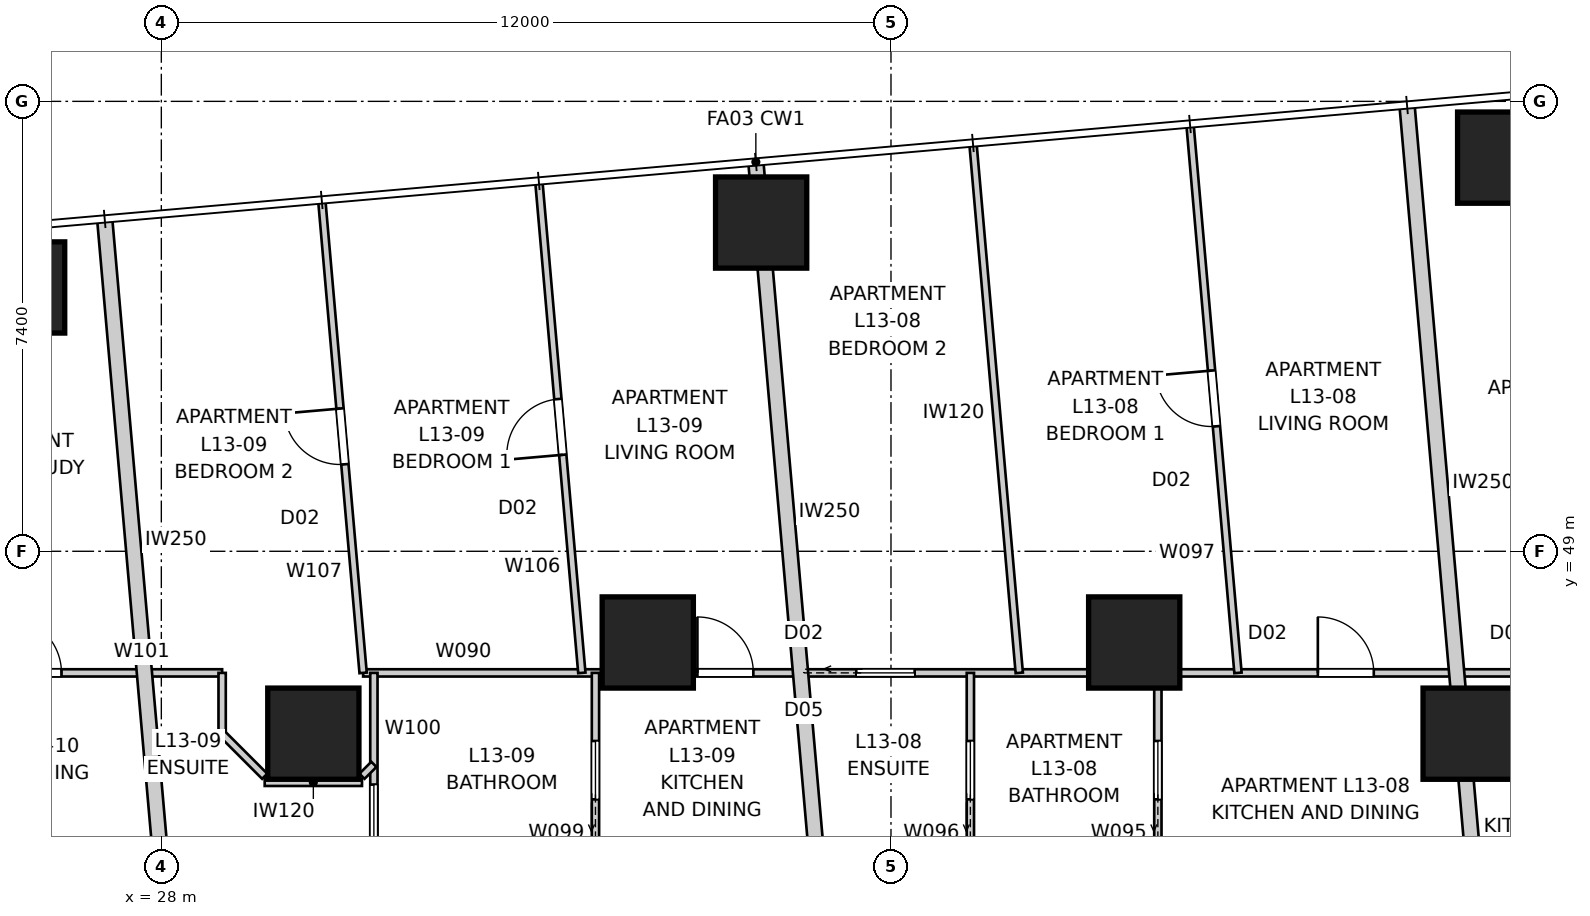
"""IFC4 building model, lengths in metres.
Left out: names, types, materials, properties, quantities, classifications, styles, units other than length and angle.
Written with IfcOpenShell. Run it as: python <this file> out.ifc"""

import sys

from ifc_helpers import new_model, si_unit, direction, frame, frame_2d, origin, origin_2d, place, context, subcontext, project, spatial, rectangle, extrude, element, fill, save


model = new_model("IFC4")
c1 = context("Model", 3, precision=1e-05, world=origin(), true_north=direction((0.0, 1.0)))
c2 = subcontext(c1, "Body", "Model", "MODEL_VIEW")
j1 = project(units=[si_unit("LENGTHUNIT", "METRE"), si_unit("PLANEANGLEUNIT", "RADIAN")], contexts=[c1])
p1 = place(None, origin())
s1 = spatial("IfcSite", under=j1, at=p1, CompositionType="ELEMENT")
p2 = place(p1, origin())
s2 = spatial("IfcBuilding", under=s1, at=p2, CompositionType="ELEMENT")
p3 = place(p2, frame((0.0, 0.0, 50.6)))
s3 = spatial("IfcBuildingStorey", under=s2, at=p3, CompositionType="ELEMENT", Elevation=50.6)
for number, where, z_axis, x_axis in (
    (1, (50.068, 55.474, 0.0), (0.0, 0.0, 1.0), (1.0, 0.0, 0.0)),
    (2, (37.865, 54.407, 0.0), (0.0, 0.0, 1.0), (1.0, 0.0, 0.0)),
    (3, (25.661, 53.339, 0.0), (0.0, 0.0, 1.0), (1.0, 0.0, 0.0)),
    (4, (49.5, 46.0, 0.0), (0.0, 0.0, 1.0), (1.0, 0.0, 0.0)),
    (5, (44.0, 47.5, 0.0), (0.0, 0.0, 1.0), (1.0, 0.0, 0.0)),
    (6, (36.0, 47.5, 0.0), (0.0, 0.0, 1.0), (1.0, 0.0, 0.0)),
    (7, (30.5, 46.0, 0.0), (0.0, 0.0, 1.0), (1.0, 0.0, 0.0)),
):
    element("IfcColumn", number, at=place(p3, frame(where, z_axis=z_axis, x_axis=x_axis)), inside=s3, PredefinedType="COLUMN", context=c2, shape_type="SweptSolid", body=[
        extrude(rectangle(XDim=1.5, YDim=1.5, at=origin_2d()), origin(), (0.0, 0.0, 1.0), 3.4),
    ])
p4 = place(p3, frame((37.778, 55.403, 0.0), z_axis=(0.0, 0.0, 1.0), x_axis=(0.087147497287, -0.996195419442, 0.0)))
e8 = element("IfcWall", 8, at=p4, inside=s3, PredefinedType="PARTITIONING", context=c2, shape_type="SweptSolid", body=[
    extrude(rectangle(XDim=11.677, YDim=0.25, at=frame_2d((5.838, 0.0))), origin(), (0.0, 0.0, 1.0), 3.25),
])
p5 = place(p3, frame((48.487, 56.34, 0.0), z_axis=(0.0, 0.0, 1.0), x_axis=(0.087153988028, -0.996194851608, 0.0)))
e9 = element("IfcWall", 9, at=p5, inside=s3, PredefinedType="PARTITIONING", context=c2, shape_type="SweptSolid", body=[
    extrude(rectangle(XDim=12.617, YDim=0.25, at=frame_2d((6.309, 0.0))), origin(), (0.0, 0.0, 1.0), 3.25),
])
p6 = place(p3, frame((27.068, 54.466, 0.0), z_axis=(0.0, 0.0, 1.0), x_axis=(0.08716441141, -0.996193939644, 0.0)))
e10 = element("IfcWall", 10, at=p6, inside=s3, PredefinedType="PARTITIONING", context=c2, shape_type="SweptSolid", body=[
    extrude(rectangle(XDim=10.736, YDim=0.25, at=frame_2d((5.368, 0.0))), origin(), (0.0, 0.0, 1.0), 3.25),
])
p7 = place(p3, frame((31.319, 47.0, 0.0), z_axis=(0.0, 0.0, 1.0), x_axis=(1.0, 0.0, 0.0)))
e11 = element("IfcWall", 11, at=p7, inside=s3, PredefinedType="PARTITIONING", context=c2, shape_type="SweptSolid", body=[
    extrude(rectangle(XDim=25.681, YDim=0.12, at=frame_2d((12.841, 0.0))), origin(), (0.0, 0.0, 1.0), 2.55),
])
p8 = place(p7, frame((15.701, 0.0, 0.0)))
e12 = element("IfcOpeningElement", 12, at=p8, cuts=e11, PredefinedType="OPENING", context=c2, shape_type="SweptSolid", body=[
    extrude(rectangle(XDim=0.92, YDim=2.34, at=frame_2d((0.46, 1.17))), frame((0.0, 0.07, 0.0), z_axis=(0.0, -1.0, 0.0), x_axis=(1.0, 0.0, 0.0)), (0.0, 0.0, 1.0), 0.14),
])
p9 = place(p7, frame((19.676, 0.0, 0.0)))
e13 = element("IfcOpeningElement", 13, at=p9, cuts=e11, PredefinedType="OPENING", context=c2, shape_type="SweptSolid", body=[
    extrude(rectangle(XDim=0.92, YDim=2.34, at=frame_2d((0.46, 1.17))), frame((0.0, 0.07, 0.0), z_axis=(0.0, -1.0, 0.0), x_axis=(1.0, 0.0, 0.0)), (0.0, 0.0, 1.0), 0.14),
])
p10 = place(p7, frame((5.498, 0.0, 0.0)))
e14 = element("IfcOpeningElement", 14, at=p10, cuts=e11, PredefinedType="OPENING", context=c2, shape_type="SweptSolid", body=[
    extrude(rectangle(XDim=0.92, YDim=2.34, at=frame_2d((0.46, 1.17))), frame((0.0, 0.07, 0.0), z_axis=(0.0, -1.0, 0.0), x_axis=(1.0, 0.0, 0.0)), (0.0, 0.0, 1.0), 0.14),
])
p11 = place(p7, frame((8.11, 0.0, 0.0)))
e15 = element("IfcOpeningElement", 15, at=p11, cuts=e11, PredefinedType="OPENING", context=c2, shape_type="SweptSolid", body=[
    extrude(rectangle(XDim=0.96, YDim=2.1, at=frame_2d((0.48, 1.05))), frame((0.0, 0.07, 0.0), z_axis=(0.0, -1.0, 0.0), x_axis=(1.0, 0.0, 0.0)), (0.0, 0.0, 1.0), 0.14),
])
p12 = place(p3, frame((44.389, 43.8, 0.0), z_axis=(0.0, 0.0, 1.0), x_axis=(0.0, 1.0, 0.0)))
e16 = element("IfcWall", 16, at=p12, inside=s3, PredefinedType="PARTITIONING", context=c2, shape_type="SweptSolid", body=[
    extrude(rectangle(XDim=3.2, YDim=0.12, at=frame_2d((1.6, 0.0))), origin(), (0.0, 0.0, 1.0), 3.25),
])
p13 = place(p12, frame((1.12, 0.0, 0.0)))
e17 = element("IfcOpeningElement", 17, at=p13, cuts=e16, PredefinedType="OPENING", context=c2, shape_type="SweptSolid", body=[
    extrude(rectangle(XDim=0.96, YDim=2.1, at=frame_2d((0.48, 1.05))), frame((0.0, 0.07, 0.0), z_axis=(0.0, -1.0, 0.0), x_axis=(1.0, 0.0, 0.0)), (0.0, 0.0, 1.0), 0.14),
])
p14 = place(p3, frame((41.305, 43.8, 0.0), z_axis=(0.0, 0.0, 1.0), x_axis=(0.0, 1.0, 0.0)))
e18 = element("IfcWall", 18, at=p14, inside=s3, PredefinedType="PARTITIONING", context=c2, shape_type="SweptSolid", body=[
    extrude(rectangle(XDim=3.2, YDim=0.12, at=frame_2d((1.6, 0.0))), origin(), (0.0, 0.0, 1.0), 3.25),
])
p15 = place(p14, frame((1.12, 0.0, 0.0)))
e19 = element("IfcOpeningElement", 19, at=p15, cuts=e18, PredefinedType="OPENING", context=c2, shape_type="SweptSolid", body=[
    extrude(rectangle(XDim=0.96, YDim=2.1, at=frame_2d((0.48, 1.05))), frame((0.0, 0.07, 0.0), z_axis=(0.0, -1.0, 0.0), x_axis=(1.0, 0.0, 0.0)), (0.0, 0.0, 1.0), 0.14),
])
p16 = place(p3, frame((45.707, 47.0, 0.0), z_axis=(0.0, 0.0, 1.0), x_axis=(-0.087160907995, 0.996194246178, 0.0)))
e20 = element("IfcWall", 20, at=p16, inside=s3, PredefinedType="PARTITIONING", context=c2, shape_type="SweptSolid", body=[
    extrude(rectangle(XDim=9.022, YDim=0.12, at=frame_2d((4.511, 0.0))), origin(), (0.0, 0.0, 1.0), 3.25),
])
p17 = place(p16, frame((4.071, 0.0, 0.0)))
e21 = element("IfcOpeningElement", 21, at=p17, cuts=e20, PredefinedType="OPENING", context=c2, shape_type="SweptSolid", body=[
    extrude(rectangle(XDim=0.92, YDim=2.34, at=frame_2d((0.46, 1.17))), frame((0.0, 0.07, 0.0), z_axis=(0.0, -1.0, 0.0), x_axis=(1.0, 0.0, 0.0)), (0.0, 0.0, 1.0), 0.14),
])
p18 = place(p3, frame((42.11, 47.0, 0.0), z_axis=(0.0, 0.0, 1.0), x_axis=(-0.087158256162, 0.996194478193, 0.0)))
e22 = element("IfcWall", 22, at=p18, inside=s3, PredefinedType="PARTITIONING", context=c2, shape_type="SweptSolid", body=[
    extrude(rectangle(XDim=8.709, YDim=0.12, at=frame_2d((4.354, 0.0))), origin(), (0.0, 0.0, 1.0), 3.25),
])
p19 = place(p3, frame((35.14, 43.8, 0.0), z_axis=(0.0, 0.0, 1.0), x_axis=(0.0, 1.0, 0.0)))
e23 = element("IfcWall", 23, at=p19, inside=s3, PredefinedType="PARTITIONING", context=c2, shape_type="SweptSolid", body=[
    extrude(rectangle(XDim=3.2, YDim=0.12, at=frame_2d((1.6, 0.0))), origin(), (0.0, 0.0, 1.0), 3.25),
])
p20 = place(p19, frame((1.12, 0.0, 0.0)))
e24 = element("IfcOpeningElement", 24, at=p20, cuts=e23, PredefinedType="OPENING", context=c2, shape_type="SweptSolid", body=[
    extrude(rectangle(XDim=0.96, YDim=2.1, at=frame_2d((0.48, 1.05))), frame((0.0, 0.07, 0.0), z_axis=(0.0, -1.0, 0.0), x_axis=(1.0, 0.0, 0.0)), (0.0, 0.0, 1.0), 0.14),
])
p21 = place(p3, frame((31.496, 43.8, 0.0), z_axis=(0.0, 0.0, 1.0), x_axis=(0.0, 1.0, 0.0)))
e25 = element("IfcWall", 25, at=p21, inside=s3, PredefinedType="PARTITIONING", context=c2, shape_type="SweptSolid", body=[
    extrude(rectangle(XDim=3.2, YDim=0.12, at=frame_2d((1.6, 0.0))), origin(), (0.0, 0.0, 1.0), 3.25),
])
p22 = place(p21, frame((0.403, 0.0, 0.0)))
e26 = element("IfcOpeningElement", 26, at=p22, cuts=e25, PredefinedType="OPENING", context=c2, shape_type="SweptSolid", body=[
    extrude(rectangle(XDim=0.96, YDim=2.1, at=frame_2d((0.48, 1.05))), frame((0.0, 0.07, 0.0), z_axis=(0.0, -1.0, 0.0), x_axis=(1.0, 0.0, 0.0)), (0.0, 0.0, 1.0), 0.14),
])
p23 = place(p3, frame((23.0, 47.0, 0.0), z_axis=(0.0, 0.0, 1.0), x_axis=(1.0, 0.0, 0.0)))
e27 = element("IfcWall", 27, at=p23, inside=s3, PredefinedType="PARTITIONING", context=c2, shape_type="SweptSolid", body=[
    extrude(rectangle(XDim=6.0, YDim=0.12, at=frame_2d((3.0, 0.0))), origin(), (0.0, 0.0, 1.0), 3.25),
])
p24 = place(p23, frame((2.438, 0.0, 0.0)))
e28 = element("IfcOpeningElement", 28, at=p24, cuts=e27, PredefinedType="OPENING", context=c2, shape_type="SweptSolid", body=[
    extrude(rectangle(XDim=0.92, YDim=2.34, at=frame_2d((0.46, 1.17))), frame((0.0, 0.07, 0.0), z_axis=(0.0, -1.0, 0.0), x_axis=(1.0, 0.0, 0.0)), (0.0, 0.0, 1.0), 0.14),
])
p25 = place(p3, frame((29.0, 47.0, 0.0), z_axis=(0.0, 0.0, 1.0), x_axis=(0.0, -1.0, 0.0)))
e29 = element("IfcWall", 29, at=p25, inside=s3, PredefinedType="PARTITIONING", context=c2, shape_type="SweptSolid", body=[
    extrude(rectangle(XDim=1.0, YDim=0.12, at=frame_2d((0.5, 0.0))), origin(), (0.0, 0.0, 1.0), 3.25),
])
p26 = place(p3, frame((29.0, 46.0, 0.0), z_axis=(0.0, 0.0, 1.0), x_axis=(0.707106781187, -0.707106781187, 0.0)))
e30 = element("IfcWall", 30, at=p26, inside=s3, PredefinedType="PARTITIONING", context=c2, shape_type="SweptSolid", body=[
    extrude(rectangle(XDim=0.99, YDim=0.12, at=frame_2d((0.495, 0.0))), origin(), (0.0, 0.0, 1.0), 3.25),
])
p27 = place(p3, frame((29.7, 45.2, 0.0), z_axis=(0.0, 0.0, 1.0), x_axis=(1.0, 0.0, 0.0)))
e31 = element("IfcWall", 31, at=p27, inside=s3, PredefinedType="PARTITIONING", context=c2, shape_type="SweptSolid", body=[
    extrude(rectangle(XDim=1.6, YDim=0.12, at=frame_2d((0.8, 0.0))), origin(), (0.0, 0.0, 1.0), 3.25),
])
p28 = place(p3, frame((31.3, 45.3, 0.0), z_axis=(0.0, 0.0, 1.0), x_axis=(0.707106781187, 0.707106781187, 0.0)))
e32 = element("IfcWall", 32, at=p28, inside=s3, PredefinedType="PARTITIONING", context=c2, shape_type="SweptSolid", body=[
    extrude(rectangle(XDim=0.277, YDim=0.12, at=frame_2d((0.138, 0.0))), origin(), (0.0, 0.0, 1.0), 3.25),
])
p29 = place(p3, frame((34.916, 47.0, 0.0), z_axis=(0.0, 0.0, 1.0), x_axis=(-0.087184938313, 0.99619214338, 0.0)))
e33 = element("IfcWall", 33, at=p29, inside=s3, PredefinedType="PARTITIONING", context=c2, shape_type="SweptSolid", body=[
    extrude(rectangle(XDim=8.082, YDim=0.12, at=frame_2d((4.041, 0.0))), origin(), (0.0, 0.0, 1.0), 3.25),
])
p30 = place(p29, frame((3.601, 0.0, 0.0)))
e34 = element("IfcOpeningElement", 34, at=p30, cuts=e33, PredefinedType="OPENING", context=c2, shape_type="SweptSolid", body=[
    extrude(rectangle(XDim=0.92, YDim=2.34, at=frame_2d((0.46, 1.17))), frame((0.0, 0.07, 0.0), z_axis=(0.0, -1.0, 0.0), x_axis=(1.0, 0.0, 0.0)), (0.0, 0.0, 1.0), 0.14),
])
p31 = place(p3, frame((31.319, 47.0, 0.0), z_axis=(0.0, 0.0, 1.0), x_axis=(-0.0871517452, 0.996195047824, 0.0)))
e35 = element("IfcWall", 35, at=p31, inside=s3, PredefinedType="PARTITIONING", context=c2, shape_type="SweptSolid", body=[
    extrude(rectangle(XDim=7.768, YDim=0.12, at=frame_2d((3.884, 0.0))), origin(), (0.0, 0.0, 1.0), 3.25),
])
p32 = place(p31, frame((3.444, 0.0, 0.0)))
e36 = element("IfcOpeningElement", 36, at=p32, cuts=e35, PredefinedType="OPENING", context=c2, shape_type="SweptSolid", body=[
    extrude(rectangle(XDim=0.92, YDim=2.34, at=frame_2d((0.46, 1.17))), frame((0.0, 0.07, 0.0), z_axis=(0.0, -1.0, 0.0), x_axis=(1.0, 0.0, 0.0)), (0.0, 0.0, 1.0), 0.14),
])
p33 = place(p8, origin())
e37 = element("IfcDoor", 37, at=p33, inside=s3, OperationType="SINGLE_SWING_LEFT", PredefinedType="DOOR", context=c2, shape_type="SweptSolid", body=[
    extrude(rectangle(XDim=0.92, YDim=2.34, at=frame_2d((0.46, 1.17))), frame((0.0, 0.025, 0.0), z_axis=(0.0, -1.0, 0.0), x_axis=(1.0, 0.0, 0.0)), (0.0, 0.0, 1.0), 0.05),
])
fill(e12, e37)
p34 = place(p13, origin())
e38 = element("IfcDoor", 38, at=p34, inside=s3, OperationType="SLIDING_TO_LEFT", PredefinedType="DOOR", context=c2, shape_type="SweptSolid", body=[
    extrude(rectangle(XDim=0.96, YDim=2.1, at=frame_2d((0.48, 1.05))), frame((0.0, 0.025, 0.0), z_axis=(0.0, -1.0, 0.0), x_axis=(1.0, 0.0, 0.0)), (0.0, 0.0, 1.0), 0.05),
])
fill(e17, e38)
p35 = place(p10, origin())
e39 = element("IfcDoor", 39, at=p35, inside=s3, OperationType="SINGLE_SWING_LEFT", PredefinedType="DOOR", context=c2, shape_type="SweptSolid", body=[
    extrude(rectangle(XDim=0.92, YDim=2.34, at=frame_2d((0.46, 1.17))), frame((0.0, 0.025, 0.0), z_axis=(0.0, -1.0, 0.0), x_axis=(1.0, 0.0, 0.0)), (0.0, 0.0, 1.0), 0.05),
])
fill(e14, e39)
p36 = place(p20, origin())
e40 = element("IfcDoor", 40, at=p36, inside=s3, OperationType="SLIDING_TO_LEFT", PredefinedType="DOOR", context=c2, shape_type="SweptSolid", body=[
    extrude(rectangle(XDim=0.96, YDim=2.1, at=frame_2d((0.48, 1.05))), frame((0.0, 0.025, 0.0), z_axis=(0.0, -1.0, 0.0), x_axis=(1.0, 0.0, 0.0)), (0.0, 0.0, 1.0), 0.05),
])
fill(e24, e40)
p37 = place(p24, origin())
e41 = element("IfcDoor", 41, at=p37, inside=s3, OperationType="SINGLE_SWING_LEFT", PredefinedType="DOOR", context=c2, shape_type="SweptSolid", body=[
    extrude(rectangle(XDim=0.92, YDim=2.34, at=frame_2d((0.46, 1.17))), frame((0.0, 0.025, 0.0), z_axis=(0.0, -1.0, 0.0), x_axis=(1.0, 0.0, 0.0)), (0.0, 0.0, 1.0), 0.05),
])
fill(e28, e41)
p38 = place(p17, origin())
e42 = element("IfcDoor", 42, at=p38, inside=s3, OperationType="SINGLE_SWING_RIGHT", PredefinedType="DOOR", context=c2, shape_type="SweptSolid", body=[
    extrude(rectangle(XDim=0.92, YDim=2.34, at=frame_2d((0.46, 1.17))), frame((0.0, 0.025, 0.0), z_axis=(0.0, -1.0, 0.0), x_axis=(1.0, 0.0, 0.0)), (0.0, 0.0, 1.0), 0.05),
])
fill(e21, e42)
p39 = place(p15, origin())
e43 = element("IfcDoor", 43, at=p39, inside=s3, OperationType="SLIDING_TO_LEFT", PredefinedType="DOOR", context=c2, shape_type="SweptSolid", body=[
    extrude(rectangle(XDim=0.96, YDim=2.1, at=frame_2d((0.48, 1.05))), frame((0.0, 0.025, 0.0), z_axis=(0.0, -1.0, 0.0), x_axis=(1.0, 0.0, 0.0)), (0.0, 0.0, 1.0), 0.05),
])
fill(e19, e43)
p40 = place(p30, origin())
e44 = element("IfcDoor", 44, at=p40, inside=s3, OperationType="SINGLE_SWING_LEFT", PredefinedType="DOOR", context=c2, shape_type="SweptSolid", body=[
    extrude(rectangle(XDim=0.92, YDim=2.34, at=frame_2d((0.46, 1.17))), frame((0.0, 0.025, 0.0), z_axis=(0.0, -1.0, 0.0), x_axis=(1.0, 0.0, 0.0)), (0.0, 0.0, 1.0), 0.05),
])
fill(e34, e44)
p41 = place(p22, origin())
e45 = element("IfcDoor", 45, at=p41, inside=s3, OperationType="SLIDING_TO_LEFT", PredefinedType="DOOR", context=c2, shape_type="SweptSolid", body=[
    extrude(rectangle(XDim=0.96, YDim=2.1, at=frame_2d((0.48, 1.05))), frame((0.0, 0.025, 0.0), z_axis=(0.0, -1.0, 0.0), x_axis=(1.0, 0.0, 0.0)), (0.0, 0.0, 1.0), 0.05),
])
fill(e26, e45)
p42 = place(p11, origin())
e46 = element("IfcDoor", 46, at=p42, inside=s3, OperationType="SLIDING_TO_LEFT", PredefinedType="DOOR", context=c2, shape_type="SweptSolid", body=[
    extrude(rectangle(XDim=0.96, YDim=2.1, at=frame_2d((0.48, 1.05))), frame((0.0, 0.025, 0.0), z_axis=(0.0, -1.0, 0.0), x_axis=(1.0, 0.0, 0.0)), (0.0, 0.0, 1.0), 0.05),
])
fill(e15, e46)
p43 = place(p32, origin())
e47 = element("IfcDoor", 47, at=p43, inside=s3, OperationType="SINGLE_SWING_RIGHT", PredefinedType="DOOR", context=c2, shape_type="SweptSolid", body=[
    extrude(rectangle(XDim=0.92, YDim=2.34, at=frame_2d((0.46, 1.17))), frame((0.0, 0.025, 0.0), z_axis=(0.0, -1.0, 0.0), x_axis=(1.0, 0.0, 0.0)), (0.0, 0.0, 1.0), 0.05),
])
fill(e36, e47)
save(model, sys.argv[1])
